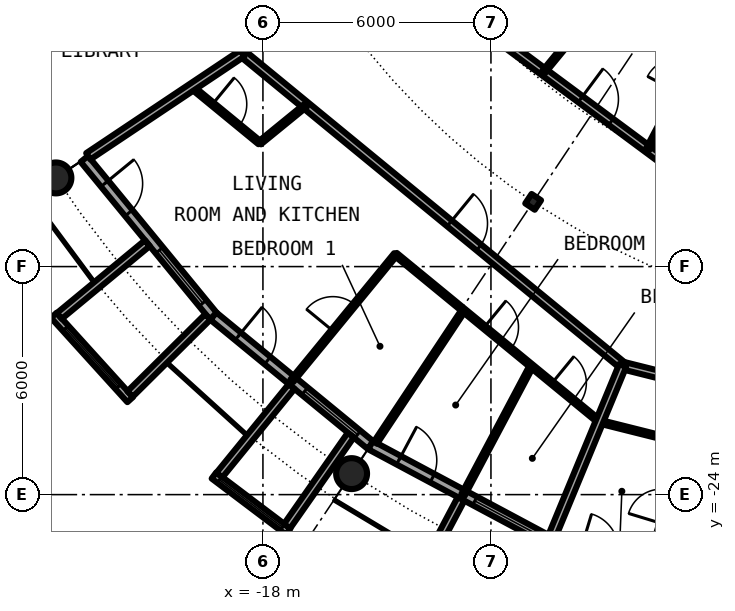
"""IFC4 building model, lengths in metres.
Left out: names, types, materials, properties, quantities, classifications, styles, units other than length and angle.
Written with IfcOpenShell. Run it as: python <this file> out.ifc"""

import sys

from ifc_helpers import new_model, si_unit, direction, frame, frame_2d, origin, origin_2d, place, context, subcontext, project, spatial, rectangle, circle, hollow_circle, i_section, extrude, element, fill, save


model = new_model("IFC4")
c1 = context("Model", 3, precision=1e-05, world=origin(), true_north=direction((0.0, 1.0)))
c2 = subcontext(c1, "Body", "Model", "MODEL_VIEW")
j1 = project(units=[si_unit("LENGTHUNIT", "METRE"), si_unit("PLANEANGLEUNIT", "RADIAN")], contexts=[c1])
p1 = place(None, origin())
s1 = spatial("IfcSite", under=j1, at=p1, CompositionType="ELEMENT")
p2 = place(p1, origin())
s2 = spatial("IfcBuilding", under=s1, at=p2, CompositionType="ELEMENT")
p3 = place(p2, frame((0.0, 0.0, 227.95)))
s3 = spatial("IfcBuildingStorey", under=s2, at=p3, CompositionType="ELEMENT", Elevation=227.95)
for number, where, z_axis, x_axis in (
    (1, (-23.448, -15.667, 0.0), (0.0, 0.0, 1.0), (1.0, 0.0, 0.0)),
    (2, (-15.667, -23.448, 0.0), (0.0, 0.0, 1.0), (1.0, 0.0, 0.0)),
):
    element("IfcColumn", number, at=place(p3, frame(where, z_axis=z_axis, x_axis=x_axis)), inside=s3, PredefinedType="COLUMN", context=c2, shape_type="SweptSolid", body=[
        extrude(hollow_circle(Radius=0.406, WallThickness=0.03, at=origin_2d()), origin(), (0.0, 0.0, 1.0), 3.05),
    ])
p4 = place(p3, frame((-10.889, -16.297, 0.0), z_axis=(0.0, 0.0, 1.0), x_axis=(-0.55557023302, -0.831469612303, 0.0)))
e3 = element("IfcColumn", 3, at=p4, inside=s3, PredefinedType="COLUMN", context=c2, shape_type="SweptSolid", body=[
    extrude(i_section(OverallWidth=0.3, OverallDepth=0.3, WebThickness=0.011, FlangeThickness=0.019, FilletRadius=0.027, at=origin_2d()), origin(), (0.0, 0.0, 1.0), 3.05),
])
p5 = place(p3, frame((-22.699, -15.167, 0.0), z_axis=(0.0, 0.0, 1.0), x_axis=(0.634382322723, -0.773019449054, 0.0)))
e4 = element("IfcWall", 4, at=p5, inside=s3, PredefinedType="SOLIDWALL", context=c2, shape_type="SweptSolid", body=[
    extrude(rectangle(XDim=5.352, YDim=0.25, at=frame_2d((2.676, 0.0))), origin(), (0.0, 0.0, 1.0), 2.7),
])
p6 = place(p5, frame((0.841, 0.0, 0.0)))
e5 = element("IfcOpeningElement", 5, at=p6, cuts=e4, PredefinedType="OPENING", context=c2, shape_type="SweptSolid", body=[
    extrude(rectangle(XDim=1.0, YDim=2.2, at=frame_2d((0.5, 1.1))), frame((0.0, 0.135, 0.0), z_axis=(0.0, -1.0, 0.0), x_axis=(1.0, 0.0, 0.0)), (0.0, 0.0, 1.0), 0.27),
])
p7 = place(p5, frame((3.111, 0.0, 0.3)))
e6 = element("IfcOpeningElement", 6, at=p7, cuts=e4, PredefinedType="OPENING", context=c2, shape_type="SweptSolid", body=[
    extrude(rectangle(XDim=1.8, YDim=2.1, at=frame_2d((0.9, 1.05))), frame((0.0, 0.135, 0.0), z_axis=(0.0, -1.0, 0.0), x_axis=(1.0, 0.0, 0.0)), (0.0, 0.0, 1.0), 0.27),
])
p8 = place(p3, frame((-23.503, -19.282, -0.03), z_axis=(0.0, 0.0, 1.0), x_axis=(0.671506829416, -0.740998365753, 0.0)))
e7 = element("IfcWall", 7, at=p8, inside=s3, PredefinedType="SOLIDWALL", context=c2, shape_type="SweptSolid", body=[
    extrude(rectangle(XDim=2.993, YDim=0.2, at=frame_2d((1.497, 0.0))), origin(), (0.0, 0.0, 1.0), 2.73),
])
p9 = place(p8, frame((0.457, 0.0, 0.33)))
e8 = element("IfcOpeningElement", 8, at=p9, cuts=e7, PredefinedType="OPENING", context=c2, shape_type="SweptSolid", body=[
    extrude(circle(Radius=1.04, at=frame_2d((1.04, 1.04))), frame((0.0, 0.11, 0.0), z_axis=(0.0, -1.0, 0.0), x_axis=(1.0, 0.0, 0.0)), (0.0, 0.0, 1.0), 0.22),
])
p10 = place(p3, frame((-21.041, -17.384, -0.03), z_axis=(0.0, 0.0, 1.0), x_axis=(-0.770784861449, -0.63709551667, 0.0)))
e9 = element("IfcWall", 9, at=p10, inside=s3, PredefinedType="SOLIDWALL", context=c2, shape_type="SweptSolid", body=[
    extrude(rectangle(XDim=3.006, YDim=0.2, at=frame_2d((1.503, 0.0))), origin(), (0.0, 0.0, 1.0), 2.73),
])
p11 = place(p3, frame((-19.45, -19.323, -0.03), z_axis=(0.0, 0.0, 1.0), x_axis=(-0.709727076896, -0.704476739375, 0.0)))
e10 = element("IfcWall", 10, at=p11, inside=s3, PredefinedType="SOLIDWALL", context=c2, shape_type="SweptSolid", body=[
    extrude(rectangle(XDim=2.883, YDim=0.2, at=frame_2d((1.441, 0.0))), origin(), (0.0, 0.0, 1.0), 2.73),
])
p12 = place(p3, frame((-19.304, -19.304, 0.0), z_axis=(0.0, 0.0, 1.0), x_axis=(0.773019449054, -0.634382322723, 0.0)))
e11 = element("IfcWall", 11, at=p12, inside=s3, PredefinedType="SOLIDWALL", context=c2, shape_type="SweptSolid", body=[
    extrude(rectangle(XDim=5.352, YDim=0.25, at=frame_2d((2.676, 0.0))), origin(), (0.0, 0.0, 1.0), 2.7),
])
p13 = place(p12, frame((0.841, 0.0, 0.0)))
e12 = element("IfcOpeningElement", 12, at=p13, cuts=e11, PredefinedType="OPENING", context=c2, shape_type="SweptSolid", body=[
    extrude(rectangle(XDim=1.0, YDim=2.2, at=frame_2d((0.5, 1.1))), frame((0.0, 0.135, 0.0), z_axis=(0.0, -1.0, 0.0), x_axis=(1.0, 0.0, 0.0)), (0.0, 0.0, 1.0), 0.27),
])
p14 = place(p12, frame((3.111, 0.0, 0.3)))
e13 = element("IfcOpeningElement", 13, at=p14, cuts=e11, PredefinedType="OPENING", context=c2, shape_type="SweptSolid", body=[
    extrude(rectangle(XDim=1.8, YDim=2.1, at=frame_2d((0.9, 1.05))), frame((0.0, 0.135, 0.0), z_axis=(0.0, -1.0, 0.0), x_axis=(1.0, 0.0, 0.0)), (0.0, 0.0, 1.0), 0.27),
])
p15 = place(p3, frame((-19.289, -23.497, -0.03), z_axis=(0.0, 0.0, 1.0), x_axis=(0.797887588059, -0.602806268067, 0.0)))
e14 = element("IfcWall", 14, at=p15, inside=s3, PredefinedType="SOLIDWALL", context=c2, shape_type="SweptSolid", body=[
    extrude(rectangle(XDim=2.447, YDim=0.2, at=frame_2d((1.223, 0.0))), origin(), (0.0, 0.0, 1.0), 2.73),
])
p16 = place(p15, frame((0.183, 0.0, 0.33)))
e15 = element("IfcOpeningElement", 15, at=p16, cuts=e14, PredefinedType="OPENING", context=c2, shape_type="SweptSolid", body=[
    extrude(circle(Radius=1.04, at=frame_2d((1.04, 1.04))), frame((0.0, 0.11, 0.0), z_axis=(0.0, -1.0, 0.0), x_axis=(1.0, 0.0, 0.0)), (0.0, 0.0, 1.0), 0.22),
])
p17 = place(p3, frame((-17.246, -21.155, -0.03), z_axis=(0.0, 0.0, 1.0), x_axis=(-0.631741648902, -0.775179004516, 0.0)))
e16 = element("IfcWall", 16, at=p17, inside=s3, PredefinedType="SOLIDWALL", context=c2, shape_type="SweptSolid", body=[
    extrude(rectangle(XDim=3.006, YDim=0.2, at=frame_2d((1.503, 0.0))), origin(), (0.0, 0.0, 1.0), 2.73),
])
p18 = place(p3, frame((-15.688, -22.433, -0.03), z_axis=(0.0, 0.0, 1.0), x_axis=(-0.573260687834, -0.819373043115, 0.0)))
e17 = element("IfcWall", 17, at=p18, inside=s3, PredefinedType="SOLIDWALL", context=c2, shape_type="SweptSolid", body=[
    extrude(rectangle(XDim=2.925, YDim=0.2, at=frame_2d((1.463, 0.0))), origin(), (0.0, 0.0, 1.0), 2.73),
])
p19 = place(p3, frame((-15.167, -22.699, 0.0), z_axis=(0.0, 0.0, 1.0), x_axis=(0.881915646801, -0.471407246368, 0.0)))
e18 = element("IfcWall", 18, at=p19, inside=s3, PredefinedType="SOLIDWALL", context=c2, shape_type="SweptSolid", body=[
    extrude(rectangle(XDim=5.352, YDim=0.25, at=frame_2d((2.676, 0.0))), origin(), (0.0, 0.0, 1.0), 2.7),
])
p20 = place(p19, frame((0.841, 0.0, 0.0)))
e19 = element("IfcOpeningElement", 19, at=p20, cuts=e18, PredefinedType="OPENING", context=c2, shape_type="SweptSolid", body=[
    extrude(rectangle(XDim=1.0, YDim=2.2, at=frame_2d((0.5, 1.1))), frame((0.0, 0.135, 0.0), z_axis=(0.0, -1.0, 0.0), x_axis=(1.0, 0.0, 0.0)), (0.0, 0.0, 1.0), 0.27),
])
p21 = place(p19, frame((3.111, 0.0, 0.3)))
e20 = element("IfcOpeningElement", 20, at=p21, cuts=e18, PredefinedType="OPENING", context=c2, shape_type="SweptSolid", body=[
    extrude(rectangle(XDim=1.8, YDim=2.1, at=frame_2d((0.9, 1.05))), frame((0.0, 0.135, 0.0), z_axis=(0.0, -1.0, 0.0), x_axis=(1.0, 0.0, 0.0)), (0.0, 0.0, 1.0), 0.27),
])
p22 = place(p3, frame((-12.787, -24.113, -0.03), z_axis=(0.0, 0.0, 1.0), x_axis=(-0.468365282436, -0.883534924159, 0.0)))
e21 = element("IfcWall", 21, at=p22, inside=s3, PredefinedType="SOLIDWALL", context=c2, shape_type="SweptSolid", body=[
    extrude(rectangle(XDim=3.006, YDim=0.2, at=frame_2d((1.503, 0.0))), origin(), (0.0, 0.0, 1.0), 2.73),
])
p23 = place(p3, frame((-9.146, -22.081, 0.0), z_axis=(0.0, 0.0, 1.0), x_axis=(0.9700564467, -0.242879579658, 0.0)))
e22 = element("IfcWall", 22, at=p23, inside=s3, PredefinedType="PARTITIONING", context=c2, shape_type="SweptSolid", body=[
    extrude(rectangle(XDim=2.338, YDim=0.1, at=frame_2d((1.169, 0.0))), origin(), (0.0, 0.0, 1.0), 2.7),
])
p24 = place(p3, frame((-19.875, -13.274, 0.0), z_axis=(0.0, 0.0, 1.0), x_axis=(0.77288890179, -0.634541366256, 0.0)))
e23 = element("IfcWall", 23, at=p24, inside=s3, PredefinedType="PARTITIONING", context=c2, shape_type="SweptSolid", body=[
    extrude(rectangle(XDim=2.313, YDim=0.1, at=frame_2d((1.157, 0.0))), origin(), (0.0, 0.0, 1.0), 2.7),
])
p25 = place(p24, frame((0.711, 0.0, 0.0)))
e24 = element("IfcOpeningElement", 24, at=p25, cuts=e23, PredefinedType="OPENING", context=c2, shape_type="SweptSolid", body=[
    extrude(rectangle(XDim=0.9, YDim=2.3, at=frame_2d((0.45, 1.15))), frame((0.0, 0.06, 0.0), z_axis=(0.0, -1.0, 0.0), x_axis=(1.0, 0.0, 0.0)), (0.0, 0.0, 1.0), 0.12),
])
p26 = place(p3, frame((-14.509, -17.679, 0.0), z_axis=(0.0, 0.0, 1.0), x_axis=(0.772956112865, -0.634459492469, 0.0)))
e25 = element("IfcWall", 25, at=p26, inside=s3, PredefinedType="PARTITIONING", context=c2, shape_type="SweptSolid", body=[
    extrude(rectangle(XDim=6.938, YDim=0.1, at=frame_2d((3.469, 0.0))), origin(), (0.0, 0.0, 1.0), 2.7),
])
p27 = place(p26, frame((3.02, 0.0, 0.0)))
e26 = element("IfcOpeningElement", 26, at=p27, cuts=e25, PredefinedType="OPENING", context=c2, shape_type="SweptSolid", body=[
    extrude(rectangle(XDim=0.9, YDim=2.3, at=frame_2d((0.45, 1.15))), frame((0.0, 0.06, 0.0), z_axis=(0.0, -1.0, 0.0), x_axis=(1.0, 0.0, 0.0)), (0.0, 0.0, 1.0), 0.12),
])
p28 = place(p26, frame((5.33, 0.0, 0.0)))
e27 = element("IfcOpeningElement", 27, at=p28, cuts=e25, PredefinedType="OPENING", context=c2, shape_type="SweptSolid", body=[
    extrude(rectangle(XDim=0.9, YDim=2.3, at=frame_2d((0.45, 1.15))), frame((0.0, 0.06, 0.0), z_axis=(0.0, -1.0, 0.0), x_axis=(1.0, 0.0, 0.0)), (0.0, 0.0, 1.0), 0.12),
])
p29 = place(p3, frame((-19.328, -10.896, 0.0), z_axis=(0.0, 0.0, 1.0), x_axis=(0.465812036273, -0.88488369115, 0.0)))
e28 = element("IfcWall", 28, at=p29, inside=s3, PredefinedType="PARTITIONING", context=c2, shape_type="SweptSolid", body=[
    extrude(rectangle(XDim=1.687, YDim=0.2, at=frame_2d((0.844, 0.0))), origin(), (0.0, 0.0, 1.0), 2.7),
])
p30 = place(p3, frame((-8.534, -20.603, 0.0), z_axis=(0.0, 0.0, 1.0), x_axis=(0.97003047456, -0.242983288366, 0.0)))
e29 = element("IfcWall", 29, at=p30, inside=s3, PredefinedType="PARTITIONING", context=c2, shape_type="SweptSolid", body=[
    extrude(rectangle(XDim=6.544, YDim=0.2, at=frame_2d((3.272, 0.0))), origin(), (0.0, 0.0, 1.0), 2.7),
])
p31 = place(p30, frame((1.681, 0.0, 0.0)))
e30 = element("IfcOpeningElement", 30, at=p31, cuts=e29, PredefinedType="OPENING", context=c2, shape_type="SweptSolid", body=[
    extrude(rectangle(XDim=1.0, YDim=2.3, at=frame_2d((0.5, 1.15))), frame((0.0, 0.11, 0.0), z_axis=(0.0, -1.0, 0.0), x_axis=(1.0, 0.0, 0.0)), (0.0, 0.0, 1.0), 0.22),
])
p32 = place(p3, frame((-18.542, -12.389, 0.0), z_axis=(0.0, 0.0, 1.0), x_axis=(0.772983503654, -0.634426121056, 0.0)))
e31 = element("IfcWall", 31, at=p32, inside=s3, PredefinedType="PARTITIONING", context=c2, shape_type="SweptSolid", body=[
    extrude(rectangle(XDim=12.947, YDim=0.2, at=frame_2d((6.474, 0.0))), origin(), (0.0, 0.0, 1.0), 2.7),
])
p33 = place(p32, frame((7.053, 0.0, 0.0)))
e32 = element("IfcOpeningElement", 32, at=p33, cuts=e31, PredefinedType="OPENING", context=c2, shape_type="SweptSolid", body=[
    extrude(rectangle(XDim=1.0, YDim=2.3, at=frame_2d((0.5, 1.15))), frame((0.0, 0.11, 0.0), z_axis=(0.0, -1.0, 0.0), x_axis=(1.0, 0.0, 0.0)), (0.0, 0.0, 1.0), 0.22),
])
p34 = place(p3, frame((-14.718, -9.833, 0.0), z_axis=(0.0, 0.0, 1.0), x_axis=(0.803240181354, -0.595655278712, 0.0)))
e33 = element("IfcWall", 33, at=p34, inside=s3, PredefinedType="PARTITIONING", context=c2, shape_type="SweptSolid", body=[
    extrude(rectangle(XDim=11.928, YDim=0.2, at=frame_2d((5.964, 0.0))), origin(), (0.0, 0.0, 1.0), 2.7),
])
p35 = place(p34, frame((6.316, 0.0, 0.0)))
e34 = element("IfcOpeningElement", 34, at=p35, cuts=e33, PredefinedType="OPENING", context=c2, shape_type="SweptSolid", body=[
    extrude(rectangle(XDim=1.0, YDim=2.3, at=frame_2d((0.5, 1.15))), frame((0.0, 0.11, 0.0), z_axis=(0.0, -1.0, 0.0), x_axis=(1.0, 0.0, 0.0)), (0.0, 0.0, 1.0), 0.22),
])
p36 = place(p3, frame((-15.039, -22.634, 0.0), z_axis=(0.0, 0.0, 1.0), x_axis=(0.553609857728, 0.832776155654, 0.0)))
e35 = element("IfcWall", 35, at=p36, inside=s3, PredefinedType="PARTITIONING", context=c2, shape_type="SweptSolid", body=[
    extrude(rectangle(XDim=4.187, YDim=0.1, at=frame_2d((2.094, 0.0))), origin(), (0.0, 0.0, 1.0), 2.7),
])
p37 = place(p3, frame((-22.595, -15.098, 0.0), z_axis=(0.0, 0.0, 1.0), x_axis=(0.831387096605, 0.55569370664, 0.0)))
e36 = element("IfcWall", 36, at=p37, inside=s3, PredefinedType="PARTITIONING", context=c2, shape_type="SweptSolid", body=[
    extrude(rectangle(XDim=4.875, YDim=0.2, at=frame_2d((2.438, 0.0))), origin(), (0.0, 0.0, 1.0), 2.7),
])
p38 = place(p3, frame((-18.084, -14.745, 0.0), z_axis=(0.0, 0.0, 1.0), x_axis=(0.774869051393, 0.632121786679, 0.0)))
e37 = element("IfcWall", 37, at=p38, inside=s3, PredefinedType="PARTITIONING", context=c2, shape_type="SweptSolid", body=[
    extrude(rectangle(XDim=1.562, YDim=0.1, at=frame_2d((0.781, 0.0))), origin(), (0.0, 0.0, 1.0), 2.7),
])
p39 = place(p3, frame((-17.24, -21.007, 0.0), z_axis=(0.0, 0.0, 1.0), x_axis=(0.634342681687, 0.77305197897, 0.0)))
e38 = element("IfcWall", 38, at=p39, inside=s3, PredefinedType="PARTITIONING", context=c2, shape_type="SweptSolid", body=[
    extrude(rectangle(XDim=4.305, YDim=0.1, at=frame_2d((2.153, 0.0))), origin(), (0.0, 0.0, 1.0), 2.7),
])
p40 = place(p39, frame((1.703, 0.0, 0.0)))
e39 = element("IfcOpeningElement", 39, at=p40, cuts=e38, PredefinedType="OPENING", context=c2, shape_type="SweptSolid", body=[
    extrude(rectangle(XDim=0.9, YDim=2.3, at=frame_2d((0.45, 1.15))), frame((0.0, 0.06, 0.0), z_axis=(0.0, -1.0, 0.0), x_axis=(1.0, 0.0, 0.0)), (0.0, 0.0, 1.0), 0.12),
])
p41 = place(p3, frame((-12.734, -24.007, 0.0), z_axis=(0.0, 0.0, 1.0), x_axis=(0.468594334564, 0.883413464701, 0.0)))
e40 = element("IfcWall", 40, at=p41, inside=s3, PredefinedType="PARTITIONING", context=c2, shape_type="SweptSolid", body=[
    extrude(rectangle(XDim=3.841, YDim=0.1, at=frame_2d((1.92, 0.0))), origin(), (0.0, 0.0, 1.0), 2.7),
])
p42 = place(p3, frame((-10.612, -12.878, 0.0), z_axis=(0.0, 0.0, 1.0), x_axis=(0.636115614725, 0.771593756262, 0.0)))
e41 = element("IfcWall", 41, at=p42, inside=s3, PredefinedType="PARTITIONING", context=c2, shape_type="SweptSolid", body=[
    extrude(rectangle(XDim=8.967, YDim=0.1, at=frame_2d((4.483, 0.0))), origin(), (0.0, 0.0, 1.0), 2.7),
])
p43 = place(p42, frame((1.667, 0.0, 0.0)))
e42 = element("IfcOpeningElement", 42, at=p43, cuts=e41, PredefinedType="OPENING", context=c2, shape_type="SweptSolid", body=[
    extrude(rectangle(XDim=0.9, YDim=2.3, at=frame_2d((0.45, 1.15))), frame((0.0, 0.06, 0.0), z_axis=(0.0, -1.0, 0.0), x_axis=(1.0, 0.0, 0.0)), (0.0, 0.0, 1.0), 0.12),
])
p44 = place(p42, frame((6.151, 0.0, 0.0)))
e43 = element("IfcOpeningElement", 43, at=p44, cuts=e41, PredefinedType="OPENING", context=c2, shape_type="SweptSolid", body=[
    extrude(rectangle(XDim=0.9, YDim=2.3, at=frame_2d((0.45, 1.15))), frame((0.0, 0.06, 0.0), z_axis=(0.0, -1.0, 0.0), x_axis=(1.0, 0.0, 0.0)), (0.0, 0.0, 1.0), 0.12),
])
p45 = place(p3, frame((-10.399, -25.106, 0.0), z_axis=(0.0, 0.0, 1.0), x_axis=(0.382651153718, 0.923892902104, 0.0)))
e44 = element("IfcWall", 44, at=p45, inside=s3, PredefinedType="PARTITIONING", context=c2, shape_type="SweptSolid", body=[
    extrude(rectangle(XDim=4.874, YDim=0.2, at=frame_2d((2.437, 0.0))), origin(), (0.0, 0.0, 1.0), 2.7),
])
p46 = place(p3, frame((-7.897, -26.002, 0.0), z_axis=(0.0, 0.0, 1.0), x_axis=(0.290784578865, 0.956788549625, 0.0)))
e45 = element("IfcWall", 45, at=p46, inside=s3, PredefinedType="PARTITIONING", context=c2, shape_type="SweptSolid", body=[
    extrude(rectangle(XDim=3.504, YDim=0.1, at=frame_2d((1.752, 0.0))), origin(), (0.0, 0.0, 1.0), 2.7),
])
p47 = place(p46, frame((1.302, 0.0, 0.0)))
e46 = element("IfcOpeningElement", 46, at=p47, cuts=e45, PredefinedType="OPENING", context=c2, shape_type="SweptSolid", body=[
    extrude(rectangle(XDim=0.9, YDim=2.3, at=frame_2d((0.45, 1.15))), frame((0.0, 0.06, 0.0), z_axis=(0.0, -1.0, 0.0), x_axis=(1.0, 0.0, 0.0)), (0.0, 0.0, 1.0), 0.12),
])
p48 = place(p3, frame((-7.874, -14.909, 0.0), z_axis=(0.0, 0.0, 1.0), x_axis=(0.467030118529, 0.884241408432, 0.0)))
e47 = element("IfcWall", 47, at=p48, inside=s3, PredefinedType="PARTITIONING", context=c2, shape_type="SweptSolid", body=[
    extrude(rectangle(XDim=4.278, YDim=0.1, at=frame_2d((2.139, 0.0))), origin(), (0.0, 0.0, 1.0), 2.7),
])
p49 = place(p48, frame((1.69, 0.0, 0.0)))
e48 = element("IfcOpeningElement", 48, at=p49, cuts=e47, PredefinedType="OPENING", context=c2, shape_type="SweptSolid", body=[
    extrude(rectangle(XDim=0.9, YDim=2.3, at=frame_2d((0.45, 1.15))), frame((0.0, 0.06, 0.0), z_axis=(0.0, -1.0, 0.0), x_axis=(1.0, 0.0, 0.0)), (0.0, 0.0, 1.0), 0.12),
])
p50 = place(p6, origin())
e49 = element("IfcDoor", 49, at=p50, inside=s3, OperationType="SINGLE_SWING_LEFT", PredefinedType="DOOR", context=c2, shape_type="SweptSolid", body=[
    extrude(rectangle(XDim=1.0, YDim=2.2, at=frame_2d((0.5, 1.1))), frame((0.0, 0.025, 0.0), z_axis=(0.0, -1.0, 0.0), x_axis=(1.0, 0.0, 0.0)), (0.0, 0.0, 1.0), 0.05),
])
fill(e5, e49)
p51 = place(p7, origin())
e50 = element("IfcWindow", 50, at=p51, inside=s3, PartitioningType="SINGLE_PANEL", PredefinedType="WINDOW", context=c2, shape_type="SweptSolid", body=[
    extrude(rectangle(XDim=1.8, YDim=2.1, at=frame_2d((0.9, 1.05))), frame((0.0, 0.03, 0.0), z_axis=(0.0, -1.0, 0.0), x_axis=(1.0, 0.0, 0.0)), (0.0, 0.0, 1.0), 0.06),
])
fill(e6, e50)
p52 = place(p9, origin())
e51 = element("IfcWindow", 51, at=p52, inside=s3, PartitioningType="SINGLE_PANEL", PredefinedType="WINDOW", context=c2, shape_type="SweptSolid", body=[
    extrude(circle(Radius=1.04, at=frame_2d((1.04, 1.04))), frame((0.0, 0.03, 0.0), z_axis=(0.0, -1.0, 0.0), x_axis=(1.0, 0.0, 0.0)), (0.0, 0.0, 1.0), 0.06),
])
fill(e8, e51)
p53 = place(p13, origin())
e52 = element("IfcDoor", 52, at=p53, inside=s3, OperationType="SINGLE_SWING_LEFT", PredefinedType="DOOR", context=c2, shape_type="SweptSolid", body=[
    extrude(rectangle(XDim=1.0, YDim=2.2, at=frame_2d((0.5, 1.1))), frame((0.0, 0.025, 0.0), z_axis=(0.0, -1.0, 0.0), x_axis=(1.0, 0.0, 0.0)), (0.0, 0.0, 1.0), 0.05),
])
fill(e12, e52)
p54 = place(p14, origin())
e53 = element("IfcWindow", 53, at=p54, inside=s3, PartitioningType="SINGLE_PANEL", PredefinedType="WINDOW", context=c2, shape_type="SweptSolid", body=[
    extrude(rectangle(XDim=1.8, YDim=2.1, at=frame_2d((0.9, 1.05))), frame((0.0, 0.03, 0.0), z_axis=(0.0, -1.0, 0.0), x_axis=(1.0, 0.0, 0.0)), (0.0, 0.0, 1.0), 0.06),
])
fill(e13, e53)
p55 = place(p16, origin())
e54 = element("IfcWindow", 54, at=p55, inside=s3, PartitioningType="SINGLE_PANEL", PredefinedType="WINDOW", context=c2, shape_type="SweptSolid", body=[
    extrude(circle(Radius=1.04, at=frame_2d((1.04, 1.04))), frame((0.0, 0.03, 0.0), z_axis=(0.0, -1.0, 0.0), x_axis=(1.0, 0.0, 0.0)), (0.0, 0.0, 1.0), 0.06),
])
fill(e15, e54)
p56 = place(p20, origin())
e55 = element("IfcDoor", 55, at=p56, inside=s3, OperationType="SINGLE_SWING_LEFT", PredefinedType="DOOR", context=c2, shape_type="SweptSolid", body=[
    extrude(rectangle(XDim=1.0, YDim=2.2, at=frame_2d((0.5, 1.1))), frame((0.0, 0.025, 0.0), z_axis=(0.0, -1.0, 0.0), x_axis=(1.0, 0.0, 0.0)), (0.0, 0.0, 1.0), 0.05),
])
fill(e19, e55)
p57 = place(p21, origin())
e56 = element("IfcWindow", 56, at=p57, inside=s3, PartitioningType="SINGLE_PANEL", PredefinedType="WINDOW", context=c2, shape_type="SweptSolid", body=[
    extrude(rectangle(XDim=1.8, YDim=2.1, at=frame_2d((0.9, 1.05))), frame((0.0, 0.03, 0.0), z_axis=(0.0, -1.0, 0.0), x_axis=(1.0, 0.0, 0.0)), (0.0, 0.0, 1.0), 0.06),
])
fill(e20, e56)
p58 = place(p33, origin())
e57 = element("IfcDoor", 57, at=p58, inside=s3, OperationType="SINGLE_SWING_RIGHT", PredefinedType="DOOR", context=c2, shape_type="SweptSolid", body=[
    extrude(rectangle(XDim=1.0, YDim=2.3, at=frame_2d((0.5, 1.15))), frame((0.0, 0.025, 0.0), z_axis=(0.0, -1.0, 0.0), x_axis=(1.0, 0.0, 0.0)), (0.0, 0.0, 1.0), 0.05),
])
fill(e32, e57)
p59 = place(p25, origin())
e58 = element("IfcDoor", 58, at=p59, inside=s3, OperationType="SINGLE_SWING_RIGHT", PredefinedType="DOOR", context=c2, shape_type="SweptSolid", body=[
    extrude(rectangle(XDim=0.9, YDim=2.3, at=frame_2d((0.45, 1.15))), frame((0.0, 0.025, 0.0), z_axis=(0.0, -1.0, 0.0), x_axis=(1.0, 0.0, 0.0)), (0.0, 0.0, 1.0), 0.05),
])
fill(e24, e58)
p60 = place(p40, origin())
e59 = element("IfcDoor", 59, at=p60, inside=s3, OperationType="SINGLE_SWING_LEFT", PredefinedType="DOOR", context=c2, shape_type="SweptSolid", body=[
    extrude(rectangle(XDim=0.9, YDim=2.3, at=frame_2d((0.45, 1.15))), frame((0.0, 0.025, 0.0), z_axis=(0.0, -1.0, 0.0), x_axis=(1.0, 0.0, 0.0)), (0.0, 0.0, 1.0), 0.05),
])
fill(e39, e59)
p61 = place(p27, origin())
e60 = element("IfcDoor", 60, at=p61, inside=s3, OperationType="SINGLE_SWING_RIGHT", PredefinedType="DOOR", context=c2, shape_type="SweptSolid", body=[
    extrude(rectangle(XDim=0.9, YDim=2.3, at=frame_2d((0.45, 1.15))), frame((0.0, 0.025, 0.0), z_axis=(0.0, -1.0, 0.0), x_axis=(1.0, 0.0, 0.0)), (0.0, 0.0, 1.0), 0.05),
])
fill(e26, e60)
p62 = place(p28, origin())
e61 = element("IfcDoor", 61, at=p62, inside=s3, OperationType="SINGLE_SWING_RIGHT", PredefinedType="DOOR", context=c2, shape_type="SweptSolid", body=[
    extrude(rectangle(XDim=0.9, YDim=2.3, at=frame_2d((0.45, 1.15))), frame((0.0, 0.025, 0.0), z_axis=(0.0, -1.0, 0.0), x_axis=(1.0, 0.0, 0.0)), (0.0, 0.0, 1.0), 0.05),
])
fill(e27, e61)
p63 = place(p35, origin())
e62 = element("IfcDoor", 62, at=p63, inside=s3, OperationType="SINGLE_SWING_RIGHT", PredefinedType="DOOR", context=c2, shape_type="SweptSolid", body=[
    extrude(rectangle(XDim=1.0, YDim=2.3, at=frame_2d((0.5, 1.15))), frame((0.0, 0.025, 0.0), z_axis=(0.0, -1.0, 0.0), x_axis=(1.0, 0.0, 0.0)), (0.0, 0.0, 1.0), 0.05),
])
fill(e34, e62)
save(model, sys.argv[1])
